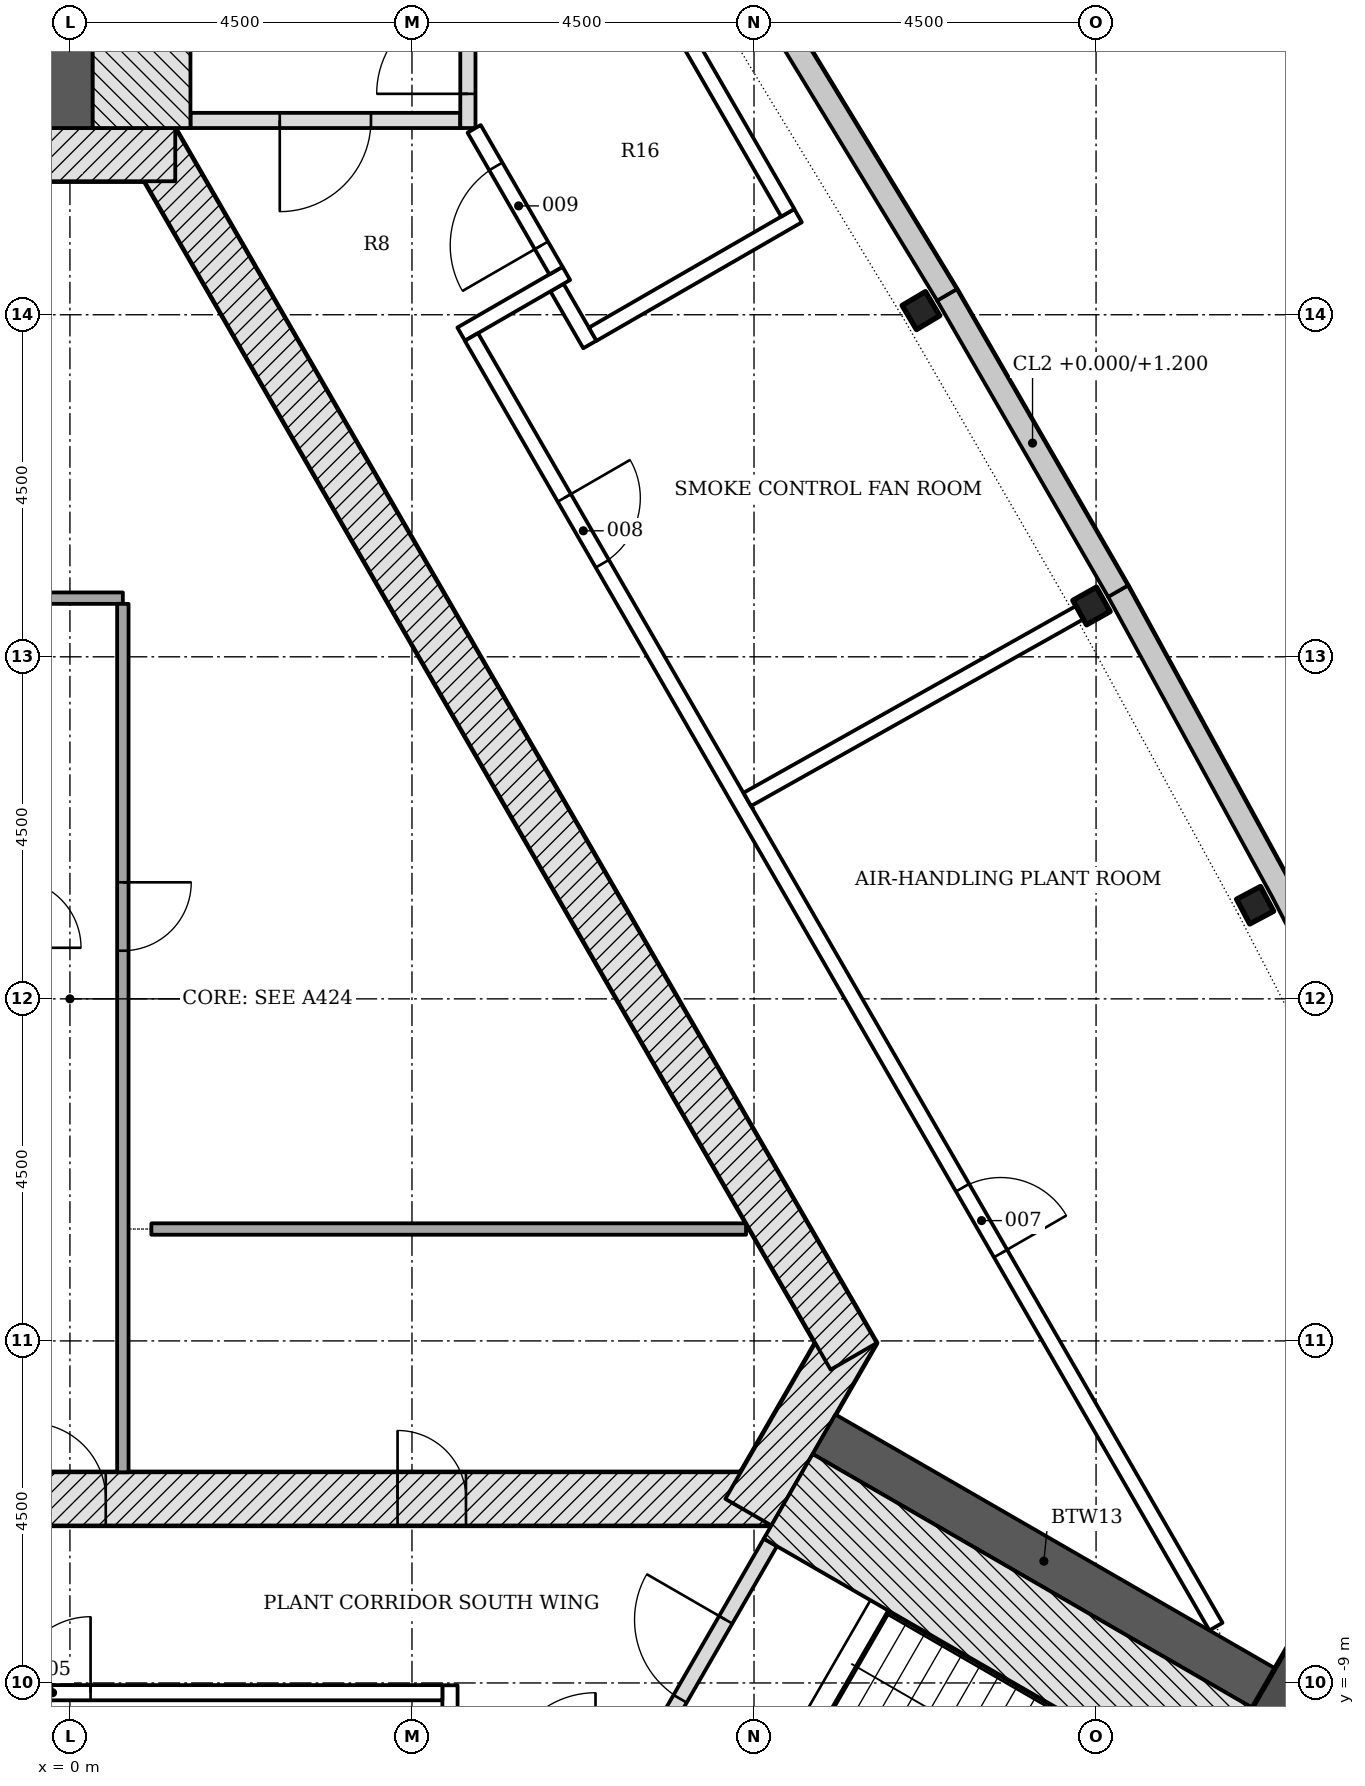
"""IFC4 building model, lengths in metres.
Left out: names, types, materials, properties, quantities, classifications, styles, units other than length and angle.
Written with IfcOpenShell. Run it as: python <this file> out.ifc"""

import sys

from ifc_helpers import new_model, si_unit, direction, frame, frame_2d, origin, origin_2d, place, context, subcontext, project, spatial, polyline, rectangle, i_section, outline, extrude, element, fill, save


model = new_model("IFC4")
c1 = context("Model", 3, precision=1e-05, world=origin(), true_north=direction((0.0, 1.0)))
c2 = subcontext(c1, "Body", "Model", "MODEL_VIEW")
j1 = project(units=[si_unit("LENGTHUNIT", "METRE"), si_unit("PLANEANGLEUNIT", "RADIAN")], contexts=[c1])
p1 = place(None, origin())
s1 = spatial("IfcSite", under=j1, at=p1, CompositionType="ELEMENT")
p2 = place(p1, origin())
s2 = spatial("IfcBuilding", under=s1, at=p2, CompositionType="ELEMENT")
p3 = place(p2, frame((0.0, 0.0, 297.6)))
s3 = spatial("IfcBuildingStorey", under=s2, at=p3, CompositionType="ELEMENT", Elevation=297.6)
p4 = place(p3, frame((-9.229, -6.578, -0.25), z_axis=(0.0, 0.0, 1.0), x_axis=(1.0, 0.0, 0.0)))
e1 = element("IfcWall", 1, at=p4, inside=s3, PredefinedType="SHEAR", context=c2, shape_type="SweptSolid", body=[
    extrude(rectangle(XDim=18.458, YDim=0.7, at=frame_2d((9.229, 0.0))), origin(), (0.0, 0.0, 1.0), 4.5),
])
p5 = place(p4, frame((8.7, 0.0, 0.25)))
e2 = element("IfcOpeningElement", 2, at=p5, cuts=e1, PredefinedType="OPENING", context=c2, shape_type="SweptSolid", body=[
    extrude(rectangle(XDim=1.0, YDim=2.1, at=frame_2d((0.5, 1.05))), frame((0.0, 0.36, 0.0), z_axis=(0.0, -1.0, 0.0), x_axis=(1.0, 0.0, 0.0)), (0.0, 0.0, 1.0), 0.72),
])
p6 = place(p4, frame((3.99, 0.0, 0.25)))
e3 = element("IfcOpeningElement", 3, at=p6, cuts=e1, PredefinedType="OPENING", context=c2, shape_type="SweptSolid", body=[
    extrude(rectangle(XDim=0.9, YDim=2.1, at=frame_2d((0.45, 1.05))), frame((0.0, 0.36, 0.0), z_axis=(0.0, -1.0, 0.0), x_axis=(1.0, 0.0, 0.0)), (0.0, 0.0, 1.0), 0.72),
])
p7 = place(p4, frame((13.539, 0.0, 0.25)))
e4 = element("IfcOpeningElement", 4, at=p7, cuts=e1, PredefinedType="OPENING", context=c2, shape_type="SweptSolid", body=[
    extrude(rectangle(XDim=0.9, YDim=2.1, at=frame_2d((0.45, 1.05))), frame((0.0, 0.36, 0.0), z_axis=(0.0, -1.0, 0.0), x_axis=(1.0, 0.0, 0.0)), (0.0, 0.0, 1.0), 0.72),
])
p8 = place(p3, frame((8.926, -6.753, -0.25), z_axis=(0.0, 0.0, 1.0), x_axis=(0.500042739161, 0.866000726912, 0.0)))
e5 = element("IfcWall", 5, at=p8, inside=s3, PredefinedType="SHEAR", context=c2, shape_type="SweptSolid", body=[
    extrude(rectangle(XDim=2.771, YDim=0.7, at=frame_2d((1.386, 0.0))), origin(), (0.0, 0.0, 1.0), 4.5),
])
p9 = place(p3, frame((10.311, -4.703, -0.25), z_axis=(0.0, 0.0, 1.0), x_axis=(-0.500001446645, 0.866024568562, 0.0)))
e6 = element("IfcWall", 6, at=p9, inside=s3, PredefinedType="SHEAR", context=c2, shape_type="SweptSolid", body=[
    extrude(rectangle(XDim=18.458, YDim=0.7, at=frame_2d((9.229, 0.0))), origin(), (0.0, 0.0, 1.0), 4.5),
])
p10 = place(p3, frame((1.386, 11.106, -0.25), z_axis=(0.0, 0.0, 1.0), x_axis=(-1.0, 0.0, 0.0)))
e7 = element("IfcWall", 7, at=p10, inside=s3, PredefinedType="SHEAR", context=c2, shape_type="SweptSolid", body=[
    extrude(rectangle(XDim=2.771, YDim=0.7, at=frame_2d((1.386, 0.0))), origin(), (0.0, 0.0, 1.0), 4.5),
])
p11 = place(p3, frame((0.0, 11.456, -0.25), z_axis=(0.0, 0.0, 1.0), x_axis=(0.0, 1.0, 0.0)))
e8 = element("IfcWall", 8, at=p11, inside=s3, PredefinedType="SHEAR", context=c2, shape_type="SweptSolid", body=[
    extrude(rectangle(XDim=6.679, YDim=0.6, at=frame_2d((3.339, 0.0))), origin(), (0.0, 0.0, 1.0), 4.5),
])
p12 = place(p3, frame((9.922, -5.728, -0.25), z_axis=(0.0, 0.0, 1.0), x_axis=(0.866032176823, -0.499988268569, 0.0)))
e9 = element("IfcWall", 9, at=p12, inside=s3, PredefinedType="SHEAR", context=c2, shape_type="SweptSolid", body=[
    extrude(rectangle(XDim=6.678, YDim=0.6, at=frame_2d((3.339, 0.0))), origin(), (0.0, 0.0, 1.0), 4.5),
])
p13 = place(p3, frame((16.745, -9.667, -0.25), z_axis=(0.0, 0.0, 1.0), x_axis=(0.866025403784, -0.5, 0.0)))
e10 = element("IfcColumn", 10, at=p13, inside=s3, PredefinedType="COLUMN", context=c2, shape_type="SweptSolid", body=[
    extrude(rectangle(XDim=2.4, YDim=2.4, at=origin_2d()), origin(), (0.0, 0.0, 1.0), 4.5),
])
for number, where, z_axis, x_axis in (
    (11, (15.593, 1.232, -0.25), (0.0, 0.0, 1.0), (-0.47, 0.883, 0.0)),
    (12, (13.44, 5.169, -0.25), (0.0, 0.0, 1.0), (-0.49, 0.872, 0.0)),
    (13, (11.196, 9.055, -0.25), (0.0, 0.0, 1.0), (-0.51, 0.86, 0.0)),
):
    element("IfcColumn", number, at=place(p3, frame(where, z_axis=z_axis, x_axis=x_axis)), inside=s3, PredefinedType="COLUMN", context=c2, shape_type="SweptSolid", body=[
        extrude(i_section(OverallWidth=0.368, OverallDepth=0.356, WebThickness=0.011, FlangeThickness=0.018, FilletRadius=0.015, at=origin_2d()), origin(), (0.0, 0.0, 1.0), 4.5),
    ])
p14 = place(p3, origin())
e14 = element("IfcWall", 14, at=p14, inside=s3, PredefinedType="NOTDEFINED", context=c2, shape_type="SweptSolid", body=[
    extrude(outline(polyline([(18.145, -2.507), (16.078, 1.49), (13.919, 5.438), (13.656, 5.294), (15.813, 1.349), (17.878, -2.645), (18.145, -2.507)])), origin(), (0.0, 0.0, 1.0), 4.25),
])
p15 = place(p3, origin())
e15 = element("IfcWall", 15, at=p15, inside=s3, PredefinedType="NOTDEFINED", context=c2, shape_type="SweptSolid", body=[
    extrude(outline(polyline([(11.669, 9.335), (9.33, 13.179), (6.901, 16.968), (6.649, 16.806), (9.075, 13.02), (11.413, 9.179), (11.669, 9.335)])), origin(), (0.0, 0.0, 1.0), 4.25),
])
p16 = place(p3, origin())
e16 = element("IfcWall", 16, at=p16, inside=s3, PredefinedType="NOTDEFINED", context=c2, shape_type="SweptSolid", body=[
    extrude(outline(polyline([(13.919, 5.438), (11.669, 9.335), (11.409, 9.185), (13.659, 5.288), (13.919, 5.438)])), origin(), (0.0, 0.0, 1.0), 1.2),
])
p17 = place(p3, origin())
e17 = element("IfcWall", 17, at=p17, inside=s3, PredefinedType="NOTDEFINED", context=c2, shape_type="SweptSolid", body=[
    extrude(outline(polyline([(11.244, -14.46), (13.211, -14.336), (14.708, -14.069), (16.111, -13.485), (17.355, -12.611), (18.381, -11.49), (19.141, -10.174), (19.599, -8.724), (19.733, -7.21), (19.538, -5.703), (19.021, -4.273), (18.145, -2.507), (17.876, -2.64), (18.745, -4.391), (19.244, -5.774), (19.432, -7.216), (19.303, -8.665), (18.865, -10.052), (18.138, -11.312), (17.156, -12.385), (15.965, -13.22), (14.623, -13.779), (13.176, -14.038), (11.225, -14.161), (11.244, -14.46)])), origin(), (0.0, 0.0, 1.0), 4.25),
])
p18 = place(p3, frame((-0.679, 5.272, 0.0), z_axis=(0.0, 0.0, 1.0), x_axis=(1.0, 0.0, 0.0)))
e18 = element("IfcWall", 18, at=p18, inside=s3, PredefinedType="PARTITIONING", context=c2, shape_type="SweptSolid", body=[
    extrude(rectangle(XDim=1.375, YDim=0.15, at=frame_2d((0.688, 0.0))), origin(), (0.0, 0.0, 1.0), 4.25),
])
p19 = place(p3, frame((0.696, 5.197, 0.0), z_axis=(0.0, 0.0, 1.0), x_axis=(0.0, -1.0, 0.0)))
e19 = element("IfcWall", 19, at=p19, inside=s3, PredefinedType="PARTITIONING", context=c2, shape_type="SweptSolid", body=[
    extrude(rectangle(XDim=11.425, YDim=0.15, at=frame_2d((5.712, 0.0))), origin(), (0.0, 0.0, 1.0), 4.25),
])
p20 = place(p19, frame((3.664, 0.0, 0.0)))
e20 = element("IfcOpeningElement", 20, at=p20, cuts=e19, PredefinedType="OPENING", context=c2, shape_type="SweptSolid", body=[
    extrude(rectangle(XDim=0.9, YDim=2.1, at=frame_2d((0.45, 1.05))), frame((0.0, 0.085, 0.0), z_axis=(0.0, -1.0, 0.0), x_axis=(1.0, 0.0, 0.0)), (0.0, 0.0, 1.0), 0.17),
])
p21 = place(p3, frame((1.071, -3.028, 0.0), z_axis=(0.0, 0.0, 1.0), x_axis=(1.0, 0.0, 0.0)))
e21 = element("IfcWall", 21, at=p21, inside=s3, PredefinedType="PARTITIONING", context=c2, shape_type="SweptSolid", body=[
    extrude(rectangle(XDim=7.824, YDim=0.15, at=frame_2d((3.912, 0.0))), origin(), (0.0, 0.0, 1.0), 4.25),
])
p22 = place(p3, frame((5.135, 11.556, -0.25), z_axis=(0.0, 0.0, 1.0), x_axis=(-1.0, 0.0, 0.0)))
e22 = element("IfcWall", 22, at=p22, inside=s3, PredefinedType="SHEAR", context=c2, shape_type="SweptSolid", body=[
    extrude(rectangle(XDim=3.55, YDim=0.2, at=frame_2d((1.775, 0.0))), origin(), (0.0, 0.0, 1.0), 4.5),
])
p23 = place(p22, frame((1.175, 0.0, 0.25)))
e23 = element("IfcOpeningElement", 23, at=p23, cuts=e22, PredefinedType="OPENING", context=c2, shape_type="SweptSolid", body=[
    extrude(rectangle(XDim=1.2, YDim=2.1, at=frame_2d((0.6, 1.05))), frame((0.0, 0.11, 0.0), z_axis=(0.0, -1.0, 0.0), x_axis=(1.0, 0.0, 0.0)), (0.0, 0.0, 1.0), 0.22),
])
p24 = place(p3, frame((5.236, 11.456, -0.25), z_axis=(0.0, 0.0, 1.0), x_axis=(0.0, 1.0, 0.0)))
e24 = element("IfcWall", 24, at=p24, inside=s3, PredefinedType="SHEAR", context=c2, shape_type="SweptSolid", body=[
    extrude(rectangle(XDim=5.6, YDim=0.2, at=frame_2d((2.8, 0.0))), origin(), (0.0, 0.0, 1.0), 4.5),
])
p25 = place(p24, frame((0.45, 0.0, 0.25)))
e25 = element("IfcOpeningElement", 25, at=p25, cuts=e24, PredefinedType="OPENING", context=c2, shape_type="SweptSolid", body=[
    extrude(rectangle(XDim=1.2, YDim=2.1, at=frame_2d((0.6, 1.05))), frame((0.0, 0.11, 0.0), z_axis=(0.0, -1.0, 0.0), x_axis=(1.0, 0.0, 0.0)), (0.0, 0.0, 1.0), 0.22),
])
p26 = place(p3, frame((0.943, 11.456, -0.25), z_axis=(0.0, 0.0, 1.0), x_axis=(0.0, 1.0, 0.0)))
e26 = element("IfcWall", 26, at=p26, inside=s3, PredefinedType="SHEAR", context=c2, shape_type="SweptSolid", body=[
    extrude(rectangle(XDim=6.679, YDim=1.286, at=frame_2d((3.339, 0.0))), origin(), (0.0, 0.0, 1.0), 4.5),
])
p27 = place(p3, frame((7.44, -10.226, -0.25), z_axis=(0.0, 0.0, 1.0), x_axis=(0.500022077904, 0.866012656725, 0.0)))
e27 = element("IfcWall", 27, at=p27, inside=s3, PredefinedType="SHEAR", context=c2, shape_type="SweptSolid", body=[
    extrude(rectangle(XDim=3.55, YDim=0.2, at=frame_2d((1.775, 0.0))), origin(), (0.0, 0.0, 1.0), 4.5),
])
p28 = place(p27, frame((1.175, 0.0, 0.25)))
e28 = element("IfcOpeningElement", 28, at=p28, cuts=e27, PredefinedType="OPENING", context=c2, shape_type="SweptSolid", body=[
    extrude(rectangle(XDim=1.2, YDim=2.1, at=frame_2d((0.6, 1.05))), frame((0.0, 0.11, 0.0), z_axis=(0.0, -1.0, 0.0), x_axis=(1.0, 0.0, 0.0)), (0.0, 0.0, 1.0), 0.22),
])
p29 = place(p3, frame((9.45, -6.545, -0.25), z_axis=(0.0, 0.0, 1.0), x_axis=(0.866016347338, -0.500015685897, 0.0)))
e29 = element("IfcWall", 29, at=p29, inside=s3, PredefinedType="SHEAR", context=c2, shape_type="SweptSolid", body=[
    extrude(rectangle(XDim=6.678, YDim=1.286, at=frame_2d((3.339, 0.0))), origin(), (0.0, 0.0, 1.0), 4.5),
])
p30 = place(p3, frame((5.0, -10.428, 0.0), z_axis=(0.0, 0.0, 1.0), x_axis=(0.0, 1.0, 0.0)))
e30 = element("IfcWall", 30, at=p30, inside=s3, PredefinedType="PARTITIONING", context=c2, shape_type="SweptSolid", body=[
    extrude(rectangle(XDim=1.398, YDim=0.2, at=frame_2d((0.699, 0.0))), origin(), (0.0, 0.0, 1.0), 4.25),
])
p31 = place(p3, frame((-15.037, -9.128, 0.0), z_axis=(0.0, 0.0, 1.0), x_axis=(1.0, 0.0, 0.0)))
e31 = element("IfcWall", 31, at=p31, inside=s3, PredefinedType="PARTITIONING", context=c2, shape_type="SweptSolid", body=[
    extrude(rectangle(XDim=19.937, YDim=0.2, at=frame_2d((9.969, 0.0))), origin(), (0.0, 0.0, 1.0), 3.702),
])
p32 = place(p31, frame((3.654, 0.0, 0.0)))
e32 = element("IfcOpeningElement", 32, at=p32, cuts=e31, PredefinedType="OPENING", context=c2, shape_type="SweptSolid", body=[
    extrude(rectangle(XDim=1.0, YDim=2.1, at=frame_2d((0.5, 1.05))), frame((0.0, 0.11, 0.0), z_axis=(0.0, -1.0, 0.0), x_axis=(1.0, 0.0, 0.0)), (0.0, 0.0, 1.0), 0.22),
])
p33 = place(p31, frame((14.309, 0.0, 0.0)))
e33 = element("IfcOpeningElement", 33, at=p33, cuts=e31, PredefinedType="OPENING", context=c2, shape_type="SweptSolid", body=[
    extrude(rectangle(XDim=1.0, YDim=2.1, at=frame_2d((0.5, 1.05))), frame((0.0, 0.11, 0.0), z_axis=(0.0, -1.0, 0.0), x_axis=(1.0, 0.0, 0.0)), (0.0, 0.0, 1.0), 0.22),
])
p34 = place(p3, frame((6.408, 9.358, 0.0), z_axis=(0.0, 0.0, 1.0), x_axis=(0.49996696679, -0.866044474677, 0.0)))
e34 = element("IfcWall", 34, at=p34, inside=s3, PredefinedType="PARTITIONING", context=c2, shape_type="SweptSolid", body=[
    extrude(rectangle(XDim=0.864, YDim=0.2, at=frame_2d((0.432, 0.0))), origin(), (0.0, 0.0, 1.0), 4.25),
])
p35 = place(p3, frame((5.147, 8.745, 0.0), z_axis=(0.0, 0.0, 1.0), x_axis=(0.865987117328, 0.500066308224, 0.0)))
e35 = element("IfcWall", 35, at=p35, inside=s3, PredefinedType="PARTITIONING", context=c2, shape_type="SweptSolid", body=[
    extrude(rectangle(XDim=1.598, YDim=0.2, at=frame_2d((0.799, 0.0))), origin(), (0.0, 0.0, 1.0), 4.25),
])
p36 = place(p3, frame((6.395, 9.581, 0.0), z_axis=(0.0, 0.0, 1.0), x_axis=(-0.500003735859, 0.866023246874, 0.0)))
e36 = element("IfcWall", 36, at=p36, inside=s3, PredefinedType="PARTITIONING", context=c2, shape_type="SweptSolid", body=[
    extrude(rectangle(XDim=2.154, YDim=0.2, at=frame_2d((1.077, 0.0))), origin(), (0.0, 0.0, 1.0), 3.702),
])
p37 = place(p36, frame((0.383, 0.0, 0.0)))
e37 = element("IfcOpeningElement", 37, at=p37, cuts=e36, PredefinedType="OPENING", context=c2, shape_type="SweptSolid", body=[
    extrude(rectangle(XDim=1.2, YDim=2.1, at=frame_2d((0.6, 1.05))), frame((0.0, 0.11, 0.0), z_axis=(0.0, -1.0, 0.0), x_axis=(1.0, 0.0, 0.0)), (0.0, 0.0, 1.0), 0.22),
])
p38 = place(p3, frame((5.282, 8.708, 0.0), z_axis=(0.0, 0.0, 1.0), x_axis=(0.500001848211, -0.866024336717, 0.0)))
e38 = element("IfcWall", 38, at=p38, inside=s3, PredefinedType="PARTITIONING", context=c2, shape_type="SweptSolid", body=[
    extrude(rectangle(XDim=19.591, YDim=0.2, at=frame_2d((9.795, 0.0))), origin(), (0.0, 0.0, 1.0), 3.702),
])
p39 = place(p38, frame((12.923, 0.0, 0.0)))
e39 = element("IfcOpeningElement", 39, at=p39, cuts=e38, PredefinedType="OPENING", context=c2, shape_type="SweptSolid", body=[
    extrude(rectangle(XDim=1.0, YDim=2.1, at=frame_2d((0.5, 1.05))), frame((0.0, 0.11, 0.0), z_axis=(0.0, -1.0, 0.0), x_axis=(1.0, 0.0, 0.0)), (0.0, 0.0, 1.0), 0.22),
])
p40 = place(p38, frame((2.444, 0.0, 0.0)))
e40 = element("IfcOpeningElement", 40, at=p40, cuts=e38, PredefinedType="OPENING", context=c2, shape_type="SweptSolid", body=[
    extrude(rectangle(XDim=1.0, YDim=2.1, at=frame_2d((0.5, 1.05))), frame((0.0, 0.11, 0.0), z_axis=(0.0, -1.0, 0.0), x_axis=(1.0, 0.0, 0.0)), (0.0, 0.0, 1.0), 0.22),
])
p41 = place(p3, frame((8.911, 2.624, 0.0), z_axis=(0.0, 0.0, 1.0), x_axis=(0.871756434121, 0.48993950603, 0.0)))
e41 = element("IfcWall", 41, at=p41, inside=s3, PredefinedType="PARTITIONING", context=c2, shape_type="SweptSolid", body=[
    extrude(rectangle(XDim=5.044, YDim=0.2, at=frame_2d((2.522, 0.0))), origin(), (0.0, 0.0, 1.0), 3.702),
])
p42 = place(p3, frame((6.878, 8.744, 0.0), z_axis=(0.0, 0.0, 1.0), x_axis=(0.866023983177, 0.500002460556, 0.0)))
e42 = element("IfcWall", 42, at=p42, inside=s3, PredefinedType="PARTITIONING", context=c2, shape_type="SweptSolid", body=[
    extrude(rectangle(XDim=3.12, YDim=0.2, at=frame_2d((1.56, 0.0))), origin(), (0.0, 0.0, 1.0), 4.25),
])
p43 = place(p3, frame((6.566, 15.327, 0.0), z_axis=(0.0, 0.0, 1.0), x_axis=(0.499997778408, -0.866026686418, 0.0)))
e43 = element("IfcWall", 43, at=p43, inside=s3, PredefinedType="PARTITIONING", context=c2, shape_type="SweptSolid", body=[
    extrude(rectangle(XDim=5.757, YDim=0.2, at=frame_2d((2.878, 0.0))), origin(), (0.0, 0.0, 1.0), 3.702),
])
p44 = place(p5, origin())
e44 = element("IfcDoor", 44, at=p44, inside=s3, OperationType="SINGLE_SWING_LEFT", PredefinedType="DOOR", context=c2, shape_type="SweptSolid", body=[
    extrude(rectangle(XDim=1.0, YDim=2.1, at=frame_2d((0.5, 1.05))), frame((0.0, 0.075, 0.0), z_axis=(0.0, -1.0, 0.0), x_axis=(1.0, 0.0, 0.0)), (0.0, 0.0, 1.0), 0.15),
])
fill(e2, e44)
p45 = place(p7, origin())
e45 = element("IfcDoor", 45, at=p45, inside=s3, OperationType="SINGLE_SWING_LEFT", PredefinedType="DOOR", context=c2, shape_type="SweptSolid", body=[
    extrude(rectangle(XDim=0.9, YDim=2.1, at=frame_2d((0.45, 1.05))), frame((0.0, 0.075, 0.0), z_axis=(0.0, -1.0, 0.0), x_axis=(1.0, 0.0, 0.0)), (0.0, 0.0, 1.0), 0.15),
])
fill(e4, e45)
p46 = place(p20, origin())
e46 = element("IfcDoor", 46, at=p46, inside=s3, OperationType="SINGLE_SWING_LEFT", PredefinedType="DOOR", context=c2, shape_type="SweptSolid", body=[
    extrude(rectangle(XDim=0.9, YDim=2.1, at=frame_2d((0.45, 1.05))), frame((0.0, 0.025, 0.0), z_axis=(0.0, -1.0, 0.0), x_axis=(1.0, 0.0, 0.0)), (0.0, 0.0, 1.0), 0.05),
])
fill(e20, e46)
p47 = place(p23, origin())
e47 = element("IfcDoor", 47, at=p47, inside=s3, OperationType="SINGLE_SWING_RIGHT", PredefinedType="DOOR", context=c2, shape_type="SweptSolid", body=[
    extrude(rectangle(XDim=1.2, YDim=2.1, at=frame_2d((0.6, 1.05))), frame((0.0, 0.025, 0.0), z_axis=(0.0, -1.0, 0.0), x_axis=(1.0, 0.0, 0.0)), (0.0, 0.0, 1.0), 0.05),
])
fill(e23, e47)
p48 = place(p25, origin())
e48 = element("IfcDoor", 48, at=p48, inside=s3, OperationType="SINGLE_SWING_LEFT", PredefinedType="DOOR", context=c2, shape_type="SweptSolid", body=[
    extrude(rectangle(XDim=1.2, YDim=2.1, at=frame_2d((0.6, 1.05))), frame((0.0, 0.025, 0.0), z_axis=(0.0, -1.0, 0.0), x_axis=(1.0, 0.0, 0.0)), (0.0, 0.0, 1.0), 0.05),
])
fill(e25, e48)
p49 = place(p28, origin())
e49 = element("IfcDoor", 49, at=p49, inside=s3, OperationType="SINGLE_SWING_RIGHT", PredefinedType="DOOR", context=c2, shape_type="SweptSolid", body=[
    extrude(rectangle(XDim=1.2, YDim=2.1, at=frame_2d((0.6, 1.05))), frame((0.0, 0.025, 0.0), z_axis=(0.0, -1.0, 0.0), x_axis=(1.0, 0.0, 0.0)), (0.0, 0.0, 1.0), 0.05),
])
fill(e28, e49)
p50 = place(p33, origin())
e50 = element("IfcDoor", 50, at=p50, inside=s3, OperationType="SINGLE_SWING_RIGHT", PredefinedType="DOOR", context=c2, shape_type="SweptSolid", body=[
    extrude(rectangle(XDim=1.0, YDim=2.1, at=frame_2d((0.5, 1.05))), frame((0.0, 0.025, 0.0), z_axis=(0.0, -1.0, 0.0), x_axis=(1.0, 0.0, 0.0)), (0.0, 0.0, 1.0), 0.05),
])
fill(e33, e50)
p51 = place(p39, origin())
e51 = element("IfcDoor", 51, at=p51, inside=s3, OperationType="SINGLE_SWING_RIGHT", PredefinedType="DOOR", context=c2, shape_type="SweptSolid", body=[
    extrude(rectangle(XDim=1.0, YDim=2.1, at=frame_2d((0.5, 1.05))), frame((0.0, 0.025, 0.0), z_axis=(0.0, -1.0, 0.0), x_axis=(1.0, 0.0, 0.0)), (0.0, 0.0, 1.0), 0.05),
])
fill(e39, e51)
p52 = place(p40, origin())
e52 = element("IfcDoor", 52, at=p52, inside=s3, OperationType="SINGLE_SWING_LEFT", PredefinedType="DOOR", context=c2, shape_type="SweptSolid", body=[
    extrude(rectangle(XDim=1.0, YDim=2.1, at=frame_2d((0.5, 1.05))), frame((0.0, 0.025, 0.0), z_axis=(0.0, -1.0, 0.0), x_axis=(1.0, 0.0, 0.0)), (0.0, 0.0, 1.0), 0.05),
])
fill(e40, e52)
p53 = place(p37, origin())
e53 = element("IfcDoor", 53, at=p53, inside=s3, OperationType="SINGLE_SWING_LEFT", PredefinedType="DOOR", context=c2, shape_type="SweptSolid", body=[
    extrude(rectangle(XDim=1.2, YDim=2.1, at=frame_2d((0.6, 1.05))), frame((0.0, 0.025, 0.0), z_axis=(0.0, -1.0, 0.0), x_axis=(1.0, 0.0, 0.0)), (0.0, 0.0, 1.0), 0.05),
])
fill(e37, e53)
save(model, sys.argv[1])
